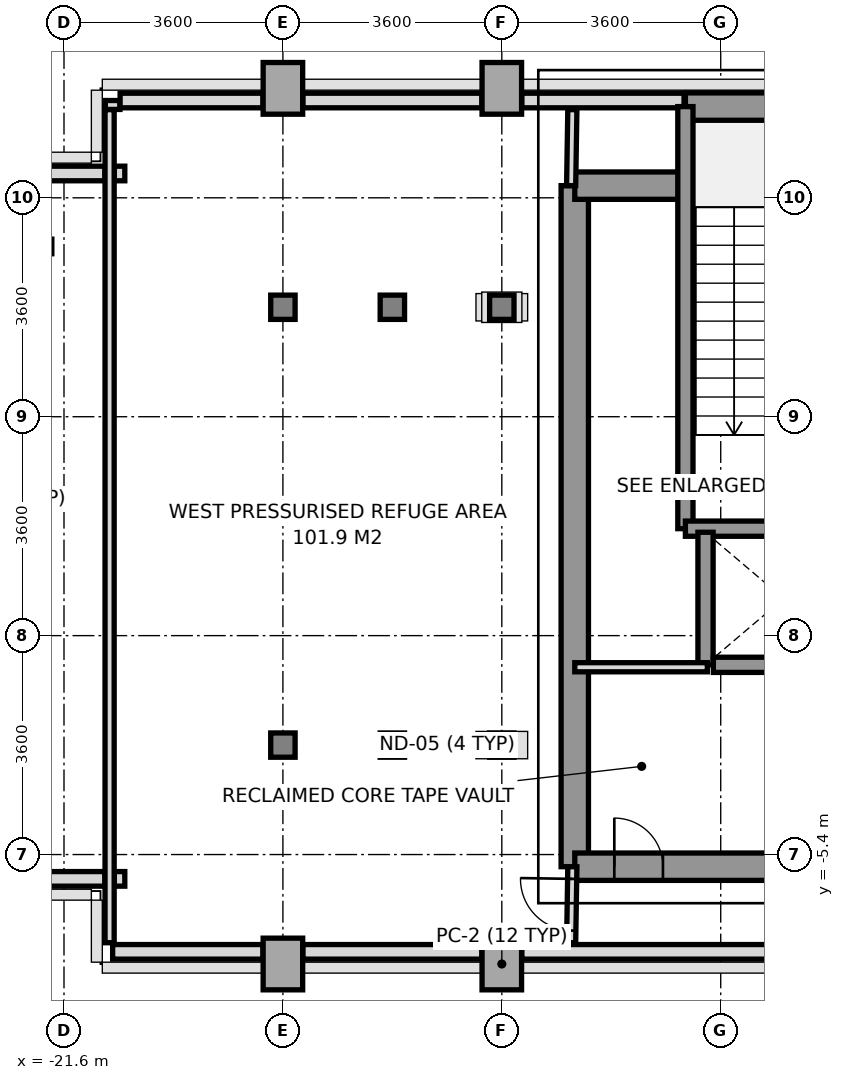
"""IFC4 building model, lengths in metres.
Left out: names, types, materials, properties, quantities, classifications, styles, units other than length and angle.
Written with IfcOpenShell. Run it as: python <this file> out.ifc"""

import sys

from ifc_helpers import new_model, si_unit, direction, frame, frame_2d, origin, origin_2d, place, context, subcontext, project, spatial, rectangle, i_section, extrude, source, transform, mapped, element, fill, save


model = new_model("IFC4")
c1 = context("Model", 3, precision=1e-05, world=origin(), true_north=direction((0.0, 1.0)))
c2 = subcontext(c1, "Body", "Model", "MODEL_VIEW")
j1 = project(units=[si_unit("LENGTHUNIT", "METRE"), si_unit("PLANEANGLEUNIT", "RADIAN")], contexts=[c1])
p1 = place(None, origin())
s1 = spatial("IfcSite", under=j1, at=p1, CompositionType="ELEMENT")
p2 = place(p1, origin())
s2 = spatial("IfcBuilding", under=s1, at=p2, CompositionType="ELEMENT")
p3 = place(p2, frame((0.0, 0.0, 151.6)))
s3 = spatial("IfcBuildingStorey", under=s2, at=p3, CompositionType="ELEMENT", Elevation=151.6)
m1 = source(origin(), c2, "Body", "SweptSolid", [
    extrude(rectangle(XDim=0.65, YDim=0.85, at=origin_2d()), origin(), (0.0, 0.0, 1.0), 4.4),
])
p4 = place(p3, frame((-18.0, -7.2, 0.0), z_axis=(0.0, 0.0, 1.0), x_axis=(1.0, 0.0, 0.0)))
e1 = element("IfcColumn", 1, at=p4, inside=s3, PredefinedType="COLUMN", context=c2, shape_type="MappedRepresentation", body=[
    mapped(m1, transform((0.0, 0.0, 0.0), x_axis=(1.0, 0.0, 0.0), y_axis=(0.0, 1.0, 0.0), z_axis=(0.0, 0.0, 1.0), scale=1.0)),
])
m2 = source(origin(), c2, "Body", "SweptSolid", [
    extrude(i_section(OverallWidth=0.401, OverallDepth=0.399, WebThickness=0.02, FlangeThickness=0.032, at=origin_2d()), origin(), (0.0, 0.0, 1.0), 4.4),
])
for number, where, z_axis, x_axis in (
    (2, (-18.0, -3.6, 0.0), (0.0, 0.0, 1.0), (1.0, 0.0, 0.0)),
    (3, (-18.0, 3.6, 0.0), (0.0, 0.0, 1.0), (1.0, 0.0, 0.0)),
):
    element("IfcColumn", number, at=place(p3, frame(where, z_axis=z_axis, x_axis=x_axis)), inside=s3, PredefinedType="COLUMN", context=c2, shape_type="MappedRepresentation", body=[
        mapped(m2, transform((0.0, 0.0, 0.0), x_axis=(1.0, 0.0, 0.0), y_axis=(0.0, 1.0, 0.0), z_axis=(0.0, 0.0, 1.0), scale=1.0)),
    ])
p5 = place(p3, frame((-18.0, 7.2, 0.0), z_axis=(0.0, 0.0, 1.0), x_axis=(1.0, 0.0, 0.0)))
e4 = element("IfcColumn", 4, at=p5, inside=s3, PredefinedType="COLUMN", context=c2, shape_type="MappedRepresentation", body=[
    mapped(m1, transform((0.0, 0.0, 0.0), x_axis=(1.0, 0.0, 0.0), y_axis=(0.0, 1.0, 0.0), z_axis=(0.0, 0.0, 1.0), scale=1.0)),
])
for number, where, z_axis, x_axis in (
    (5, (-16.2, -3.6, 0.0), (0.0, 0.0, 1.0), (1.0, 0.0, 0.0)),
    (6, (-16.2, 3.6, 0.0), (0.0, 0.0, 1.0), (1.0, 0.0, 0.0)),
):
    element("IfcColumn", number, at=place(p3, frame(where, z_axis=z_axis, x_axis=x_axis)), inside=s3, PredefinedType="COLUMN", context=c2, shape_type="MappedRepresentation", body=[
        mapped(m2, transform((0.0, 0.0, 0.0), x_axis=(1.0, 0.0, 0.0), y_axis=(0.0, 1.0, 0.0), z_axis=(0.0, 0.0, 1.0), scale=1.0)),
    ])
p6 = place(p3, frame((-14.4, -7.2, 0.0), z_axis=(0.0, 0.0, 1.0), x_axis=(1.0, 0.0, 0.0)))
e7 = element("IfcColumn", 7, at=p6, inside=s3, PredefinedType="COLUMN", context=c2, shape_type="MappedRepresentation", body=[
    mapped(m1, transform((0.0, 0.0, 0.0), x_axis=(1.0, 0.0, 0.0), y_axis=(0.0, 1.0, 0.0), z_axis=(0.0, 0.0, 1.0), scale=1.0)),
])
for number, where, z_axis, x_axis in (
    (8, (-14.4, -3.6, 0.0), (0.0, 0.0, 1.0), (1.0, 0.0, 0.0)),
    (9, (-14.4, 3.6, 0.0), (0.0, 0.0, 1.0), (1.0, 0.0, 0.0)),
):
    element("IfcColumn", number, at=place(p3, frame(where, z_axis=z_axis, x_axis=x_axis)), inside=s3, PredefinedType="COLUMN", context=c2, shape_type="MappedRepresentation", body=[
        mapped(m2, transform((0.0, 0.0, 0.0), x_axis=(1.0, 0.0, 0.0), y_axis=(0.0, 1.0, 0.0), z_axis=(0.0, 0.0, 1.0), scale=1.0)),
    ])
p7 = place(p3, frame((-14.4, 7.2, 0.0), z_axis=(0.0, 0.0, 1.0), x_axis=(1.0, 0.0, 0.0)))
e10 = element("IfcColumn", 10, at=p7, inside=s3, PredefinedType="COLUMN", context=c2, shape_type="MappedRepresentation", body=[
    mapped(m1, transform((0.0, 0.0, 0.0), x_axis=(1.0, 0.0, 0.0), y_axis=(0.0, 1.0, 0.0), z_axis=(0.0, 0.0, 1.0), scale=1.0)),
])
p8 = place(p3, frame((-9.523, -7.0, 0.0), z_axis=(0.0, 0.0, 1.0), x_axis=(-1.0, 0.0, 0.0)))
e11 = element("IfcWall", 11, at=p8, inside=s3, PredefinedType="PARAPET", context=c2, shape_type="SweptSolid", body=[
    extrude(rectangle(XDim=4.549, YDim=0.24, at=frame_2d((2.274, 0.0))), origin(), (0.0, 0.0, 1.0), 1.15),
])
p9 = place(p3, frame((-14.728, -7.0, 0.0), z_axis=(0.0, 0.0, 1.0), x_axis=(-1.0, 0.0, 0.0)))
e12 = element("IfcWall", 12, at=p9, inside=s3, PredefinedType="PARAPET", context=c2, shape_type="SweptSolid", body=[
    extrude(rectangle(XDim=2.944, YDim=0.24, at=frame_2d((1.472, 0.0))), origin(), (0.0, 0.0, 1.0), 1.15),
])
p10 = place(p3, frame((-18.328, -7.0, 0.0), z_axis=(0.0, 0.0, 1.0), x_axis=(-1.0, 0.0, 0.0)))
e13 = element("IfcWall", 13, at=p10, inside=s3, PredefinedType="PARAPET", context=c2, shape_type="SweptSolid", body=[
    extrude(rectangle(XDim=2.472, YDim=0.24, at=frame_2d((1.236, 0.0))), origin(), (0.0, 0.0, 1.0), 1.15),
])
p11 = place(p3, frame((-20.6, -5.8, 0.0), z_axis=(0.0, 0.0, 1.0), x_axis=(-1.0, 0.0, 0.0)))
e14 = element("IfcWall", 14, at=p11, inside=s3, PredefinedType="PARAPET", context=c2, shape_type="SweptSolid", body=[
    extrude(rectangle(XDim=0.172, YDim=0.24, at=frame_2d((0.086, 0.0))), origin(), (0.0, 0.0, 1.0), 1.15),
])
p12 = place(p3, frame((-20.928, -5.8, 0.0), z_axis=(0.0, 0.0, 1.0), x_axis=(-1.0, 0.0, 0.0)))
e15 = element("IfcWall", 15, at=p12, inside=s3, PredefinedType="PARAPET", context=c2, shape_type="SweptSolid", body=[
    extrude(rectangle(XDim=1.072, YDim=0.24, at=frame_2d((0.536, 0.0))), origin(), (0.0, 0.0, 1.0), 1.15),
])
p13 = place(p3, frame((-21.877, 5.8, 0.0), z_axis=(0.0, 0.0, 1.0), x_axis=(1.0, 0.0, 0.0)))
e16 = element("IfcWall", 16, at=p13, inside=s3, PredefinedType="PARAPET", context=c2, shape_type="SweptSolid", body=[
    extrude(rectangle(XDim=0.949, YDim=0.24, at=frame_2d((0.475, 0.0))), origin(), (0.0, 0.0, 1.0), 1.15),
])
p14 = place(p3, frame((-20.772, 5.8, 0.0), z_axis=(0.0, 0.0, 1.0), x_axis=(1.0, 0.0, 0.0)))
e17 = element("IfcWall", 17, at=p14, inside=s3, PredefinedType="PARAPET", context=c2, shape_type="SweptSolid", body=[
    extrude(rectangle(XDim=0.172, YDim=0.24, at=frame_2d((0.086, 0.0))), origin(), (0.0, 0.0, 1.0), 1.15),
])
p15 = place(p3, frame((-20.8, 6.853, 0.0), z_axis=(0.0, 0.0, 1.0), x_axis=(0.0, 1.0, 0.0)))
e18 = element("IfcWall", 18, at=p15, inside=s3, PredefinedType="PARAPET", context=c2, shape_type="SweptSolid", body=[
    extrude(rectangle(XDim=0.147, YDim=0.24, at=frame_2d((0.073, 0.0))), origin(), (0.0, 0.0, 1.0), 1.15),
])
p16 = place(p3, frame((-20.677, 7.0, 0.0), z_axis=(0.0, 0.0, 1.0), x_axis=(1.0, 0.0, 0.0)))
e19 = element("IfcWall", 19, at=p16, inside=s3, PredefinedType="PARAPET", context=c2, shape_type="SweptSolid", body=[
    extrude(rectangle(XDim=2.349, YDim=0.24, at=frame_2d((1.175, 0.0))), origin(), (0.0, 0.0, 1.0), 1.15),
])
p17 = place(p3, frame((-17.672, 7.0, 0.0), z_axis=(0.0, 0.0, 1.0), x_axis=(1.0, 0.0, 0.0)))
e20 = element("IfcWall", 20, at=p17, inside=s3, PredefinedType="PARAPET", context=c2, shape_type="SweptSolid", body=[
    extrude(rectangle(XDim=2.944, YDim=0.24, at=frame_2d((1.472, 0.0))), origin(), (0.0, 0.0, 1.0), 1.15),
])
p18 = place(p3, frame((-14.072, 7.0, 0.0), z_axis=(0.0, 0.0, 1.0), x_axis=(1.0, 0.0, 0.0)))
e21 = element("IfcWall", 21, at=p18, inside=s3, PredefinedType="PARAPET", context=c2, shape_type="SweptSolid", body=[
    extrude(rectangle(XDim=2.669, YDim=0.24, at=frame_2d((1.334, 0.0))), origin(), (0.0, 0.0, 1.0), 1.15),
])
p19 = place(p3, frame((-13.2, -5.6, 0.0), z_axis=(0.0, 0.0, 1.0), x_axis=(0.0, 1.0, 0.0)))
e22 = element("IfcWall", 22, at=p19, inside=s3, PredefinedType="SHEAR", context=c2, shape_type="SweptSolid", body=[
    extrude(rectangle(XDim=11.2, YDim=0.45, at=frame_2d((5.6, 0.0))), origin(), (0.0, 0.0, 1.0), 4.4),
])
p20 = place(p3, frame((-11.381, 6.9, 0.0), z_axis=(0.0, 0.0, 1.0), x_axis=(1.0, 0.0, 0.0)))
e23 = element("IfcWall", 23, at=p20, inside=s3, PredefinedType="SHEAR", context=c2, shape_type="SweptSolid", body=[
    extrude(rectangle(XDim=5.981, YDim=0.45, at=frame_2d((2.991, 0.0))), origin(), (0.0, 0.0, 1.0), 4.4),
])
p21 = place(p3, frame((-13.2, 5.6, 0.0), z_axis=(0.0, 0.0, 1.0), x_axis=(1.0, 0.0, 0.0)))
e24 = element("IfcWall", 24, at=p21, inside=s3, PredefinedType="SHEAR", context=c2, shape_type="SweptSolid", body=[
    extrude(rectangle(XDim=1.819, YDim=0.45, at=frame_2d((0.909, 0.0))), origin(), (0.0, 0.0, 1.0), 4.4),
])
p22 = place(p3, frame((-13.2, -5.6, 0.0), z_axis=(0.0, 0.0, 1.0), x_axis=(1.0, 0.0, 0.0)))
e25 = element("IfcWall", 25, at=p22, inside=s3, PredefinedType="SHEAR", context=c2, shape_type="SweptSolid", body=[
    extrude(rectangle(XDim=7.8, YDim=0.45, at=frame_2d((3.9, 0.0))), origin(), (0.0, 0.0, 1.0), 4.4),
])
p23 = place(p22, frame((3.6, 0.0, 0.0)))
e26 = element("IfcOpeningElement", 26, at=p23, cuts=e25, PredefinedType="OPENING", context=c2, shape_type="SweptSolid", body=[
    extrude(rectangle(XDim=1.2, YDim=2.2, at=frame_2d((0.6, 1.1))), frame((0.0, 0.235, 0.0), z_axis=(0.0, -1.0, 0.0), x_axis=(1.0, 0.0, 0.0)), (0.0, 0.0, 1.0), 0.47),
])
p24 = place(p22, frame((0.65, 0.0, 0.0)))
e27 = element("IfcOpeningElement", 27, at=p24, cuts=e25, PredefinedType="OPENING", context=c2, shape_type="SweptSolid", body=[
    extrude(rectangle(XDim=0.8, YDim=2.1, at=frame_2d((0.4, 1.05))), frame((0.0, 0.235, 0.0), z_axis=(0.0, -1.0, 0.0), x_axis=(1.0, 0.0, 0.0)), (0.0, 0.0, 1.0), 0.47),
])
p25 = place(p3, frame((-11.381, -0.041, 0.0), z_axis=(0.0, 0.0, 1.0), x_axis=(0.0, 1.0, 0.0)))
e28 = element("IfcWall", 28, at=p25, inside=s3, PredefinedType="SOLIDWALL", context=c2, shape_type="SweptSolid", body=[
    extrude(rectangle(XDim=6.941, YDim=0.25, at=frame_2d((3.47, 0.0))), origin(), (0.0, 0.0, 1.0), 4.4),
])
p26 = place(p3, frame((-11.381, -0.041, 0.0), z_axis=(0.0, 0.0, 1.0), x_axis=(1.0, 0.0, 0.0)))
e29 = element("IfcWall", 29, at=p26, inside=s3, PredefinedType="SOLIDWALL", context=c2, shape_type="SweptSolid", body=[
    extrude(rectangle(XDim=3.202, YDim=0.25, at=frame_2d((1.601, 0.0))), origin(), (0.0, 0.0, 1.0), 4.4),
])
p27 = place(p3, frame((-11.05, -2.28, 0.0), z_axis=(0.0, 0.0, 1.0), x_axis=(0.0, 1.0, 0.0)))
e30 = element("IfcWall", 30, at=p27, inside=s3, PredefinedType="SOLIDWALL", context=c2, shape_type="SweptSolid", body=[
    extrude(rectangle(XDim=2.18, YDim=0.25, at=frame_2d((1.09, 0.0))), origin(), (0.0, 0.0, 1.0), 4.4),
])
p28 = place(p3, frame((-10.921, -2.28, 0.0), z_axis=(0.0, 0.0, 1.0), x_axis=(1.0, 0.0, 0.0)))
e31 = element("IfcWall", 31, at=p28, inside=s3, PredefinedType="SOLIDWALL", context=c2, shape_type="SweptSolid", body=[
    extrude(rectangle(XDim=2.312, YDim=0.25, at=frame_2d((1.156, 0.0))), origin(), (0.0, 0.0, 1.0), 4.4),
])
p29 = place(p3, frame((-13.2, -2.32, 0.0), z_axis=(0.0, 0.0, 1.0), x_axis=(1.0, 0.0, 0.0)))
e32 = element("IfcWall", 32, at=p29, inside=s3, PredefinedType="PARTITIONING", context=c2, shape_type="SweptSolid", body=[
    extrude(rectangle(XDim=2.18, YDim=0.15, at=frame_2d((1.09, 0.0))), origin(), (0.0, 0.0, 1.0), 4.4),
])
p30 = place(p3, frame((-13.26, -6.85, 0.0), z_axis=(0.0, 0.0, 1.0), x_axis=(0.016013571389, 0.999871774545, 0.0)))
e33 = element("IfcWall", 33, at=p30, inside=s3, PredefinedType="PARTITIONING", context=c2, shape_type="SweptSolid", body=[
    extrude(rectangle(XDim=1.25, YDim=0.15, at=frame_2d((0.625, 0.0))), origin(), (0.0, 0.0, 1.0), 4.4),
])
p31 = place(p30, frame((0.2, 0.0, 0.0)))
e34 = element("IfcOpeningElement", 34, at=p31, cuts=e33, PredefinedType="OPENING", context=c2, shape_type="SweptSolid", body=[
    extrude(rectangle(XDim=0.85, YDim=2.1, at=frame_2d((0.425, 1.05))), frame((0.0, 0.085, 0.0), z_axis=(0.0, -1.0, 0.0), x_axis=(1.0, 0.0, 0.0)), (0.0, 0.0, 1.0), 0.17),
])
p32 = place(p3, frame((-13.26, 5.6, 0.0), z_axis=(0.0, 0.0, 1.0), x_axis=(0.016013571389, 0.999871774545, 0.0)))
e35 = element("IfcWall", 35, at=p32, inside=s3, PredefinedType="PARTITIONING", context=c2, shape_type="SweptSolid", body=[
    extrude(rectangle(XDim=1.25, YDim=0.15, at=frame_2d((0.625, 0.0))), origin(), (0.0, 0.0, 1.0), 4.4),
])
p33 = place(p3, frame((-20.85, -6.85, 0.0), z_axis=(0.0, 0.0, 1.0), x_axis=(0.0, 1.0, 0.0)))
e36 = element("IfcWall", 36, at=p33, inside=s3, PredefinedType="PARTITIONING", context=c2, shape_type="SweptSolid", body=[
    extrude(rectangle(XDim=13.7, YDim=0.15, at=frame_2d((6.85, 0.0))), origin(), (0.0, 0.0, 1.0), 4.4),
])
m3 = source(origin(), c2, "Body", "SweptSolid", [
    extrude(rectangle(XDim=0.8, YDim=2.1, at=frame_2d((0.4, 1.05))), frame((0.0, 0.025, 0.0), z_axis=(0.0, -1.0, 0.0), x_axis=(1.0, 0.0, 0.0)), (0.0, 0.0, 1.0), 0.05),
])
p34 = place(p24, origin())
e37 = element("IfcDoor", 37, at=p34, inside=s3, OperationType="SINGLE_SWING_LEFT", PredefinedType="DOOR", context=c2, shape_type="MappedRepresentation", body=[
    mapped(m3, transform((0.0, 0.0, 0.0), x_axis=(1.0, 0.0, 0.0), y_axis=(0.0, 1.0, 0.0), z_axis=(0.0, 0.0, 1.0), scale=1.0)),
])
fill(e27, e37)
m4 = source(origin(), c2, "Body", "SweptSolid", [
    extrude(rectangle(XDim=0.85, YDim=2.1, at=frame_2d((0.425, 1.05))), frame((0.0, 0.025, 0.0), z_axis=(0.0, -1.0, 0.0), x_axis=(1.0, 0.0, 0.0)), (0.0, 0.0, 1.0), 0.05),
])
p35 = place(p31, origin())
e38 = element("IfcDoor", 38, at=p35, inside=s3, OperationType="SINGLE_SWING_RIGHT", PredefinedType="DOOR", context=c2, shape_type="MappedRepresentation", body=[
    mapped(m4, transform((0.0, 0.0, 0.0), x_axis=(1.0, 0.0, 0.0), y_axis=(0.0, 1.0, 0.0), z_axis=(0.0, 0.0, 1.0), scale=1.0)),
])
fill(e34, e38)
save(model, sys.argv[1])
